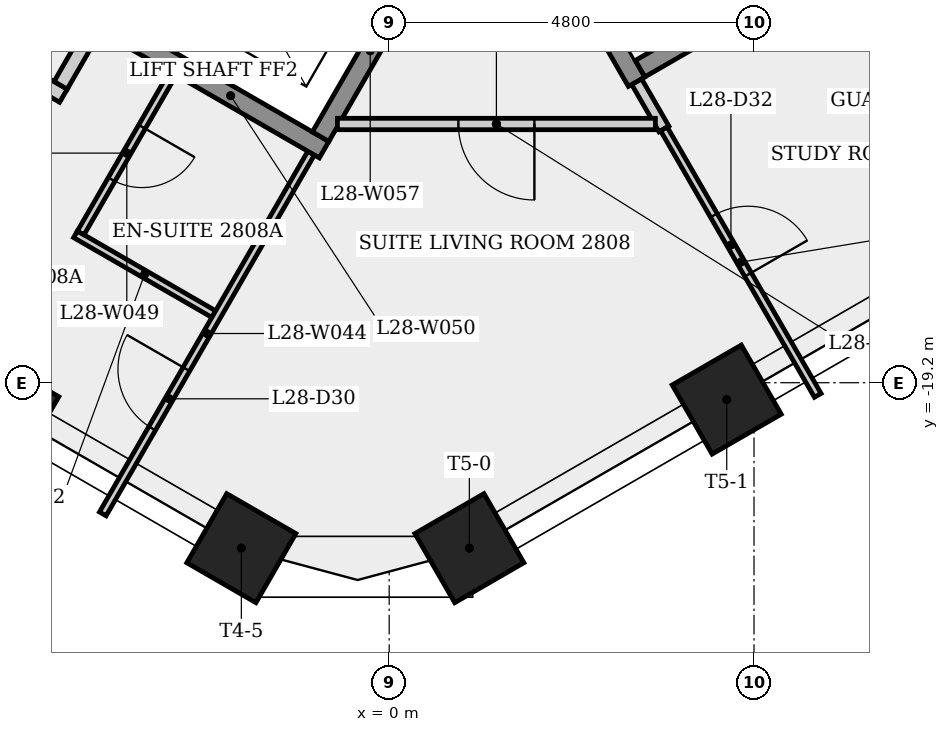
"""IFC4 building model, lengths in metres.
Left out: names, types, materials, properties, quantities, classifications, styles, units other than length and angle.
Written with IfcOpenShell. Run it as: python <this file> out.ifc"""

import sys

from ifc_helpers import new_model, si_unit, direction, frame, frame_2d, origin, origin_2d, place, context, subcontext, project, spatial, rectangle, extrude, element, fill, save


model = new_model("IFC4")
c1 = context("Model", 3, precision=1e-05, world=origin(), true_north=direction((0.0, 1.0)))
c2 = subcontext(c1, "Body", "Model", "MODEL_VIEW")
j1 = project(units=[si_unit("LENGTHUNIT", "METRE"), si_unit("PLANEANGLEUNIT", "RADIAN")], contexts=[c1])
p1 = place(None, origin())
s1 = spatial("IfcSite", under=j1, at=p1, CompositionType="ELEMENT")
p2 = place(p1, origin())
s2 = spatial("IfcBuilding", under=s1, at=p2, CompositionType="ELEMENT")
p3 = place(p2, frame((0.0, 0.0, 106.9)))
s3 = spatial("IfcBuildingStorey", under=s2, at=p3, CompositionType="ELEMENT", Elevation=106.9)
for number, where, z_axis, x_axis in (
    (1, (-5.064, -19.576, 0.0), (0.0, 0.0, 1.0), (-0.5, -0.866, 0.0)),
    (2, (-1.945, -21.377, 0.0), (0.0, 0.0, 1.0), (-0.5, -0.866, 0.0)),
    (3, (1.055, -21.377, 0.0), (0.0, 0.0, 1.0), (0.5, -0.866, 0.0)),
    (4, (4.441, -19.422, 0.0), (0.0, 0.0, 1.0), (0.5, -0.866, 0.0)),
):
    element("IfcColumn", number, at=place(p3, frame(where, z_axis=z_axis, x_axis=x_axis)), inside=s3, PredefinedType="COLUMN", context=c2, shape_type="SweptSolid", body=[
        extrude(rectangle(XDim=1.05, YDim=1.05, at=origin_2d()), origin(), (0.0, 0.0, 1.0), 3.4),
    ])
p4 = place(p3, frame((-4.286, -15.423, 0.0), z_axis=(0.0, 0.0, 1.0), x_axis=(-0.866025371046, 0.500000056704, 0.0)))
e5 = element("IfcWall", 5, at=p4, inside=s3, PredefinedType="PARTITIONING", context=c2, shape_type="SweptSolid", body=[
    extrude(rectangle(XDim=1.7, YDim=0.2, at=frame_2d((0.85, 0.0))), origin(), (0.0, 0.0, 1.0), 3.05),
])
p5 = place(p3, frame((-4.127, -17.247, 0.0), z_axis=(0.0, 0.0, 1.0), x_axis=(0.866038466041, -0.499977374825, 0.0)))
e6 = element("IfcWall", 6, at=p5, inside=s3, PredefinedType="PARTITIONING", context=c2, shape_type="SweptSolid", body=[
    extrude(rectangle(XDim=2.1, YDim=0.1, at=frame_2d((1.05, 0.0))), origin(), (0.0, 0.0, 1.0), 3.05),
])
p6 = place(p3, frame((-3.885, -14.529, 0.0), z_axis=(0.0, 0.0, 1.0), x_axis=(-0.499859285417, -0.866106630146, 0.0)))
e7 = element("IfcWall", 7, at=p6, inside=s3, PredefinedType="PARTITIONING", context=c2, shape_type="SweptSolid", body=[
    extrude(rectangle(XDim=0.875, YDim=0.2, at=frame_2d((0.438, 0.0))), origin(), (0.0, 0.0, 1.0), 3.05),
])
p7 = place(p3, frame((-3.768, -20.926, 0.0), z_axis=(0.0, 0.0, 1.0), x_axis=(0.499980760091, 0.866036511666, 0.0)))
e8 = element("IfcWall", 8, at=p7, inside=s3, PredefinedType="PARTITIONING", context=c2, shape_type="SweptSolid", body=[
    extrude(rectangle(XDim=5.482, YDim=0.1, at=frame_2d((2.741, 0.0))), origin(), (0.0, 0.0, 1.0), 3.05),
])
p8 = place(p7, frame((1.299, 0.0, 0.0)))
e9 = element("IfcOpeningElement", 9, at=p8, cuts=e8, PredefinedType="OPENING", context=c2, shape_type="SweptSolid", body=[
    extrude(rectangle(XDim=0.9, YDim=2.1, at=frame_2d((0.45, 1.05))), frame((0.0, 0.06, 0.0), z_axis=(0.0, -1.0, 0.0), x_axis=(1.0, 0.0, 0.0)), (0.0, 0.0, 1.0), 0.12),
])
p9 = place(p3, frame((-2.846, -15.129, 0.0), z_axis=(0.0, 0.0, 1.0), x_axis=(-0.500047793048, -0.865997808697, 0.0)))
e10 = element("IfcWall", 10, at=p9, inside=s3, PredefinedType="PARTITIONING", context=c2, shape_type="SweptSolid", body=[
    extrude(rectangle(XDim=2.425, YDim=0.1, at=frame_2d((1.212, 0.0))), origin(), (0.0, 0.0, 1.0), 3.05),
])
p10 = place(p9, frame((0.812, 0.0, 0.0)))
e11 = element("IfcOpeningElement", 11, at=p10, cuts=e10, PredefinedType="OPENING", context=c2, shape_type="SweptSolid", body=[
    extrude(rectangle(XDim=0.8, YDim=2.1, at=frame_2d((0.4, 1.05))), frame((0.0, 0.06, 0.0), z_axis=(0.0, -1.0, 0.0), x_axis=(1.0, 0.0, 0.0)), (0.0, 0.0, 1.0), 0.12),
])
p11 = place(p3, frame((-3.931, -14.358, 0.0), z_axis=(0.0, 0.0, 1.0), x_axis=(0.8660424351, -0.499970499736, 0.0)))
e12 = element("IfcWall", 12, at=p11, inside=s3, PredefinedType="SHEAR", context=c2, shape_type="SweptSolid", body=[
    extrude(rectangle(XDim=3.55, YDim=0.25, at=frame_2d((1.775, 0.0))), origin(), (0.0, 0.0, 1.0), 3.05),
])
p12 = place(p3, frame((-0.902, -15.962, 0.0), z_axis=(0.0, 0.0, 1.0), x_axis=(0.499981517636, 0.866036074319, 0.0)))
e13 = element("IfcWall", 13, at=p12, inside=s3, PredefinedType="SHEAR", context=c2, shape_type="SweptSolid", body=[
    extrude(rectangle(XDim=2.61, YDim=0.25, at=frame_2d((1.305, 0.0))), origin(), (0.0, 0.0, 1.0), 3.05),
])
p13 = place(p3, frame((3.256, -15.239, 0.0), z_axis=(0.0, 0.0, 1.0), x_axis=(0.499830307316, -0.866123353737, 0.0)))
e14 = element("IfcWall", 14, at=p13, inside=s3, PredefinedType="PARTITIONING", context=c2, shape_type="SweptSolid", body=[
    extrude(rectangle(XDim=0.719, YDim=0.15, at=frame_2d((0.359, 0.0))), origin(), (0.0, 0.0, 1.0), 3.05),
])
p14 = place(p3, frame((3.256, -15.239, 0.0), z_axis=(0.0, 0.0, 1.0), x_axis=(-0.50002537861, 0.866010750942, 0.0)))
e15 = element("IfcWall", 15, at=p14, inside=s3, PredefinedType="SHEAR", context=c2, shape_type="SweptSolid", body=[
    extrude(rectangle(XDim=3.0, YDim=0.25, at=frame_2d((1.5, 0.0))), origin(), (0.0, 0.0, 1.0), 3.05),
])
p15 = place(p3, frame((3.502, -15.796, 0.0), z_axis=(0.0, 0.0, 1.0), x_axis=(-1.0, 0.0, 0.0)))
e16 = element("IfcWall", 16, at=p15, inside=s3, PredefinedType="PARTITIONING", context=c2, shape_type="SweptSolid", body=[
    extrude(rectangle(XDim=4.183, YDim=0.15, at=frame_2d((2.092, 0.0))), origin(), (0.0, 0.0, 1.0), 3.05),
])
p16 = place(p15, frame((1.592, 0.0, 0.0)))
e17 = element("IfcOpeningElement", 17, at=p16, cuts=e16, PredefinedType="OPENING", context=c2, shape_type="SweptSolid", body=[
    extrude(rectangle(XDim=1.0, YDim=2.1, at=frame_2d((0.5, 1.05))), frame((0.0, 0.085, 0.0), z_axis=(0.0, -1.0, 0.0), x_axis=(1.0, 0.0, 0.0)), (0.0, 0.0, 1.0), 0.17),
])
p17 = place(p3, frame((3.615, -15.861, 0.0), z_axis=(0.0, 0.0, 1.0), x_axis=(0.500018313359, -0.866014830303, 0.0)))
e18 = element("IfcWall", 18, at=p17, inside=s3, PredefinedType="PARTITIONING", context=c2, shape_type="SweptSolid", body=[
    extrude(rectangle(XDim=4.048, YDim=0.1, at=frame_2d((2.024, 0.0))), origin(), (0.0, 0.0, 1.0), 3.05),
])
p18 = place(p17, frame((1.313, 0.0, 0.0)))
e19 = element("IfcOpeningElement", 19, at=p18, cuts=e18, PredefinedType="OPENING", context=c2, shape_type="SweptSolid", body=[
    extrude(rectangle(XDim=0.9, YDim=2.1, at=frame_2d((0.45, 1.05))), frame((0.0, 0.06, 0.0), z_axis=(0.0, -1.0, 0.0), x_axis=(1.0, 0.0, 0.0)), (0.0, 0.0, 1.0), 0.12),
])
p19 = place(p3, frame((3.301, -15.068, 0.0), z_axis=(0.0, 0.0, 1.0), x_axis=(0.866035036182, 0.499983315828, 0.0)))
e20 = element("IfcWall", 20, at=p19, inside=s3, PredefinedType="SHEAR", context=c2, shape_type="SweptSolid", body=[
    extrude(rectangle(XDim=6.4, YDim=0.25, at=frame_2d((3.2, 0.0))), origin(), (0.0, 0.0, 1.0), 3.05),
])
p20 = place(p16, origin())
e21 = element("IfcDoor", 21, at=p20, inside=s3, OperationType="SINGLE_SWING_LEFT", PredefinedType="DOOR", context=c2, shape_type="SweptSolid", body=[
    extrude(rectangle(XDim=1.0, YDim=2.1, at=frame_2d((0.5, 1.05))), frame((0.0, 0.025, 0.0), z_axis=(0.0, -1.0, 0.0), x_axis=(1.0, 0.0, 0.0)), (0.0, 0.0, 1.0), 0.05),
])
fill(e17, e21)
p21 = place(p8, origin())
e22 = element("IfcDoor", 22, at=p21, inside=s3, OperationType="SINGLE_SWING_RIGHT", PredefinedType="DOOR", context=c2, shape_type="SweptSolid", body=[
    extrude(rectangle(XDim=0.9, YDim=2.1, at=frame_2d((0.45, 1.05))), frame((0.0, 0.025, 0.0), z_axis=(0.0, -1.0, 0.0), x_axis=(1.0, 0.0, 0.0)), (0.0, 0.0, 1.0), 0.05),
])
fill(e9, e22)
p22 = place(p10, origin())
e23 = element("IfcDoor", 23, at=p22, inside=s3, OperationType="SINGLE_SWING_LEFT", PredefinedType="DOOR", context=c2, shape_type="SweptSolid", body=[
    extrude(rectangle(XDim=0.8, YDim=2.1, at=frame_2d((0.4, 1.05))), frame((0.0, 0.025, 0.0), z_axis=(0.0, -1.0, 0.0), x_axis=(1.0, 0.0, 0.0)), (0.0, 0.0, 1.0), 0.05),
])
fill(e11, e23)
p23 = place(p18, origin())
e24 = element("IfcDoor", 24, at=p23, inside=s3, OperationType="SINGLE_SWING_RIGHT", PredefinedType="DOOR", context=c2, shape_type="SweptSolid", body=[
    extrude(rectangle(XDim=0.9, YDim=2.1, at=frame_2d((0.45, 1.05))), frame((0.0, 0.025, 0.0), z_axis=(0.0, -1.0, 0.0), x_axis=(1.0, 0.0, 0.0)), (0.0, 0.0, 1.0), 0.05),
])
fill(e19, e24)
save(model, sys.argv[1])
